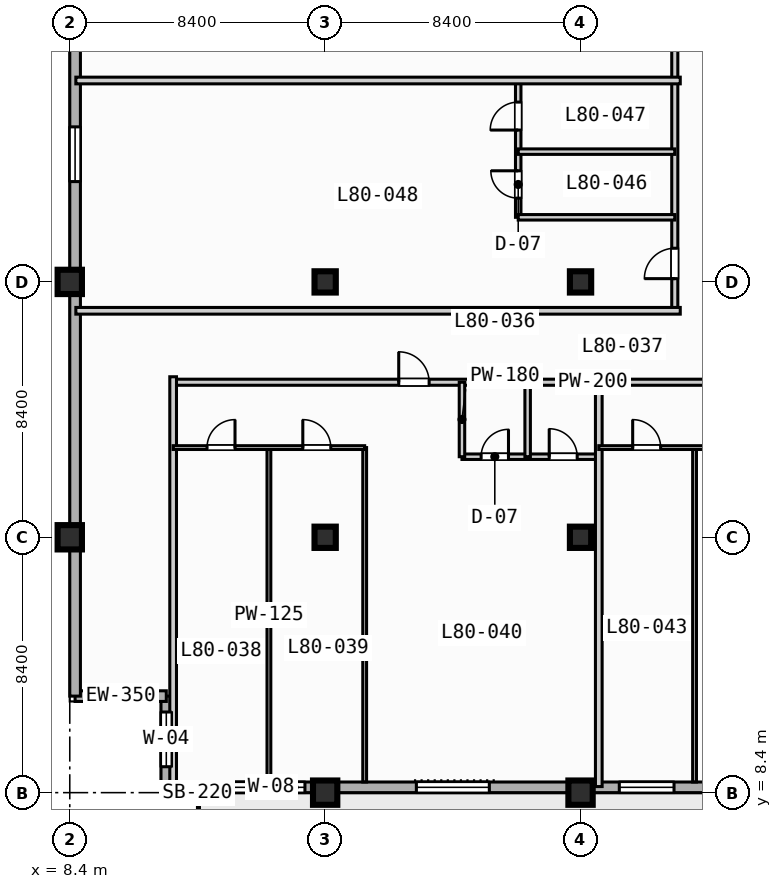
"""IFC4 building model, lengths in metres.
Left out: names, types, materials, properties, quantities, classifications, styles, units other than length and angle.
Written with IfcOpenShell. Run it as: python <this file> out.ifc"""

import sys

from ifc_helpers import new_model, si_unit, direction, frame, frame_2d, origin, origin_2d, place, context, subcontext, project, spatial, rectangle, extrude, element, fill, save


model = new_model("IFC4")
c1 = context("Model", 3, precision=1e-05, world=origin(), true_north=direction((0.0, 1.0)))
c2 = subcontext(c1, "Body", "Model", "MODEL_VIEW")
j1 = project(units=[si_unit("LENGTHUNIT", "METRE"), si_unit("PLANEANGLEUNIT", "RADIAN")], contexts=[c1])
p1 = place(None, origin())
s1 = spatial("IfcSite", under=j1, at=p1, CompositionType="ELEMENT")
p2 = place(p1, origin())
s2 = spatial("IfcBuilding", under=s1, at=p2, CompositionType="ELEMENT")
p3 = place(p2, frame((0.0, 0.0, 324.2)))
s3 = spatial("IfcBuildingStorey", under=s2, at=p3, CompositionType="ELEMENT", Elevation=324.2)
for number, where, z_axis, x_axis in (
    (1, (8.4, 16.8, 0.0), (0.0, 0.0, 1.0), (1.0, 0.0, 0.0)),
    (2, (8.4, 25.2, 0.0), (0.0, 0.0, 1.0), (1.0, 0.0, 0.0)),
    (3, (16.8, 8.4, 0.0), (0.0, 0.0, 1.0), (1.0, 0.0, 0.0)),
):
    element("IfcColumn", number, at=place(p3, frame(where, z_axis=z_axis, x_axis=x_axis)), inside=s3, PredefinedType="COLUMN", context=c2, shape_type="SweptSolid", body=[
        extrude(rectangle(XDim=0.8, YDim=0.8, at=origin_2d()), origin(), (0.0, 0.0, 1.0), 3.9),
    ])
for number, where, z_axis, x_axis in (
    (4, (16.8, 16.8, 0.0), (0.0, 0.0, 1.0), (1.0, 0.0, 0.0)),
    (5, (16.8, 25.2, 0.0), (0.0, 0.0, 1.0), (1.0, 0.0, 0.0)),
):
    element("IfcColumn", number, at=place(p3, frame(where, z_axis=z_axis, x_axis=x_axis)), inside=s3, PredefinedType="COLUMN", context=c2, shape_type="SweptSolid", body=[
        extrude(rectangle(XDim=0.7, YDim=0.7, at=origin_2d()), origin(), (0.0, 0.0, 1.0), 3.9),
    ])
p4 = place(p3, frame((25.2, 8.4, 0.0), z_axis=(0.0, 0.0, 1.0), x_axis=(1.0, 0.0, 0.0)))
e6 = element("IfcColumn", 6, at=p4, inside=s3, PredefinedType="COLUMN", context=c2, shape_type="SweptSolid", body=[
    extrude(rectangle(XDim=0.8, YDim=0.8, at=origin_2d()), origin(), (0.0, 0.0, 1.0), 3.9),
])
for number, where, z_axis, x_axis in (
    (7, (25.2, 16.8, 0.0), (0.0, 0.0, 1.0), (1.0, 0.0, 0.0)),
    (8, (25.2, 25.2, 0.0), (0.0, 0.0, 1.0), (1.0, 0.0, 0.0)),
):
    element("IfcColumn", number, at=place(p3, frame(where, z_axis=z_axis, x_axis=x_axis)), inside=s3, PredefinedType="COLUMN", context=c2, shape_type="SweptSolid", body=[
        extrude(rectangle(XDim=0.7, YDim=0.7, at=origin_2d()), origin(), (0.0, 0.0, 1.0), 3.9),
    ])
p5 = place(p3, frame((11.575, 8.575, 0.0), z_axis=(0.0, 0.0, 1.0), x_axis=(0.0, 1.0, 0.0)))
e9 = element("IfcWall", 9, at=p5, inside=s3, PredefinedType="STANDARD", context=c2, shape_type="SweptSolid", body=[
    extrude(rectangle(XDim=3.0, YDim=0.35, at=frame_2d((1.5, 0.0))), origin(), (0.0, 0.0, 1.0), 3.67),
])
p6 = place(p5, frame((0.677, 0.0, 0.85)))
e10 = element("IfcOpeningElement", 10, at=p6, cuts=e9, PredefinedType="OPENING", context=c2, shape_type="SweptSolid", body=[
    extrude(rectangle(XDim=1.8, YDim=1.8, at=frame_2d((0.9, 0.9))), frame((0.0, 0.185, 0.0), z_axis=(0.0, -1.0, 0.0), x_axis=(1.0, 0.0, 0.0)), (0.0, 0.0, 1.0), 0.37),
])
p7 = place(p3, frame((11.575, 11.575, 0.0), z_axis=(0.0, 0.0, 1.0), x_axis=(-1.0, 0.0, 0.0)))
e11 = element("IfcWall", 11, at=p7, inside=s3, PredefinedType="STANDARD", context=c2, shape_type="SweptSolid", body=[
    extrude(rectangle(XDim=3.0, YDim=0.35, at=frame_2d((1.5, 0.0))), origin(), (0.0, 0.0, 1.0), 3.67),
])
p8 = place(p3, frame((8.575, 11.575, 0.0), z_axis=(0.0, 0.0, 1.0), x_axis=(0.0, 1.0, 0.0)))
e12 = element("IfcWall", 12, at=p8, inside=s3, PredefinedType="STANDARD", context=c2, shape_type="SweptSolid", body=[
    extrude(rectangle(XDim=60.85, YDim=0.35, at=frame_2d((30.425, 0.0))), origin(), (0.0, 0.0, 1.0), 3.67),
])
p9 = place(p8, frame((33.925, 0.0, 0.0)))
e13 = element("IfcOpeningElement", 13, at=p9, cuts=e12, PredefinedType="OPENING", context=c2, shape_type="SweptSolid", body=[
    extrude(rectangle(XDim=1.4, YDim=2.2, at=frame_2d((0.7, 1.1))), frame((0.0, 0.185, 0.0), z_axis=(0.0, -1.0, 0.0), x_axis=(1.0, 0.0, 0.0)), (0.0, 0.0, 1.0), 0.37),
])
p10 = place(p8, frame((16.925, 0.0, 0.85)))
e14 = element("IfcOpeningElement", 14, at=p10, cuts=e12, PredefinedType="OPENING", context=c2, shape_type="SweptSolid", body=[
    extrude(rectangle(XDim=1.8, YDim=1.8, at=frame_2d((0.9, 0.9))), frame((0.0, 0.185, 0.0), z_axis=(0.0, -1.0, 0.0), x_axis=(1.0, 0.0, 0.0)), (0.0, 0.0, 1.0), 0.37),
])
p11 = place(p8, frame((25.025, 0.0, 0.85)))
e15 = element("IfcOpeningElement", 15, at=p11, cuts=e12, PredefinedType="OPENING", context=c2, shape_type="SweptSolid", body=[
    extrude(rectangle(XDim=2.4, YDim=1.95, at=frame_2d((1.2, 0.975))), frame((0.0, 0.185, 0.0), z_axis=(0.0, -1.0, 0.0), x_axis=(1.0, 0.0, 0.0)), (0.0, 0.0, 1.0), 0.37),
])
p12 = place(p8, frame((41.825, 0.0, 0.85)))
e16 = element("IfcOpeningElement", 16, at=p12, cuts=e12, PredefinedType="OPENING", context=c2, shape_type="SweptSolid", body=[
    extrude(rectangle(XDim=2.4, YDim=1.95, at=frame_2d((1.2, 0.975))), frame((0.0, 0.185, 0.0), z_axis=(0.0, -1.0, 0.0), x_axis=(1.0, 0.0, 0.0)), (0.0, 0.0, 1.0), 0.37),
])
p13 = place(p3, frame((64.025, 8.575, 0.0), z_axis=(0.0, 0.0, 1.0), x_axis=(-1.0, 0.0, 0.0)))
e17 = element("IfcWall", 17, at=p13, inside=s3, PredefinedType="STANDARD", context=c2, shape_type="SweptSolid", body=[
    extrude(rectangle(XDim=52.45, YDim=0.35, at=frame_2d((26.225, 0.0))), origin(), (0.0, 0.0, 1.0), 3.67),
])
p14 = place(p13, frame((32.925, 0.0, 0.0)))
e18 = element("IfcOpeningElement", 18, at=p14, cuts=e17, PredefinedType="OPENING", context=c2, shape_type="SweptSolid", body=[
    extrude(rectangle(XDim=1.4, YDim=2.2, at=frame_2d((0.7, 1.1))), frame((0.0, 0.185, 0.0), z_axis=(0.0, -1.0, 0.0), x_axis=(1.0, 0.0, 0.0)), (0.0, 0.0, 1.0), 0.37),
])
p15 = place(p13, frame((41.825, 0.0, 0.85)))
e19 = element("IfcOpeningElement", 19, at=p15, cuts=e17, PredefinedType="OPENING", context=c2, shape_type="SweptSolid", body=[
    extrude(rectangle(XDim=2.4, YDim=1.95, at=frame_2d((1.2, 0.975))), frame((0.0, 0.185, 0.0), z_axis=(0.0, -1.0, 0.0), x_axis=(1.0, 0.0, 0.0)), (0.0, 0.0, 1.0), 0.37),
])
p16 = place(p13, frame((25.025, 0.0, 0.85)))
e20 = element("IfcOpeningElement", 20, at=p16, cuts=e17, PredefinedType="OPENING", context=c2, shape_type="SweptSolid", body=[
    extrude(rectangle(XDim=2.4, YDim=1.95, at=frame_2d((1.2, 0.975))), frame((0.0, 0.185, 0.0), z_axis=(0.0, -1.0, 0.0), x_axis=(1.0, 0.0, 0.0)), (0.0, 0.0, 1.0), 0.37),
])
p17 = place(p13, frame((16.925, 0.0, 0.85)))
e21 = element("IfcOpeningElement", 21, at=p17, cuts=e17, PredefinedType="OPENING", context=c2, shape_type="SweptSolid", body=[
    extrude(rectangle(XDim=1.8, YDim=1.8, at=frame_2d((0.9, 0.9))), frame((0.0, 0.185, 0.0), z_axis=(0.0, -1.0, 0.0), x_axis=(1.0, 0.0, 0.0)), (0.0, 0.0, 1.0), 0.37),
])
p18 = place(p13, frame((49.75, 0.0, 0.85)))
e22 = element("IfcOpeningElement", 22, at=p18, cuts=e17, PredefinedType="OPENING", context=c2, shape_type="SweptSolid", body=[
    extrude(rectangle(XDim=1.8, YDim=1.8, at=frame_2d((0.9, 0.9))), frame((0.0, 0.185, 0.0), z_axis=(0.0, -1.0, 0.0), x_axis=(1.0, 0.0, 0.0)), (0.0, 0.0, 1.0), 0.37),
])
p19 = place(p13, frame((47.89, 0.0, 0.85)))
e23 = element("IfcOpeningElement", 23, at=p19, cuts=e17, PredefinedType="OPENING", context=c2, shape_type="SweptSolid", body=[
    extrude(rectangle(XDim=0.72, YDim=1.8, at=frame_2d((0.36, 0.9))), frame((0.0, 0.185, 0.0), z_axis=(0.0, -1.0, 0.0), x_axis=(1.0, 0.0, 0.0)), (0.0, 0.0, 1.0), 0.37),
])
p20 = place(p13, frame((35.75, 0.0, 0.85)))
e24 = element("IfcOpeningElement", 24, at=p20, cuts=e17, PredefinedType="OPENING", context=c2, shape_type="SweptSolid", body=[
    extrude(rectangle(XDim=1.8, YDim=1.8, at=frame_2d((0.9, 0.9))), frame((0.0, 0.185, 0.0), z_axis=(0.0, -1.0, 0.0), x_axis=(1.0, 0.0, 0.0)), (0.0, 0.0, 1.0), 0.37),
])
p21 = place(p3, frame((11.8, 21.9, 0.0), z_axis=(0.0, 0.0, 1.0), x_axis=(1.0, 0.0, 0.0)))
e25 = element("IfcWall", 25, at=p21, inside=s3, PredefinedType="PARTITIONING", context=c2, shape_type="SweptSolid", body=[
    extrude(rectangle(XDim=27.6, YDim=0.2, at=frame_2d((13.8, 0.0))), origin(), (0.0, 0.0, 1.0), 3.67),
])
p22 = place(p21, frame((7.42, 0.0, 0.0)))
e26 = element("IfcOpeningElement", 26, at=p22, cuts=e25, PredefinedType="OPENING", context=c2, shape_type="SweptSolid", body=[
    extrude(rectangle(XDim=1.0, YDim=2.15, at=frame_2d((0.5, 1.075))), frame((0.0, 0.11, 0.0), z_axis=(0.0, -1.0, 0.0), x_axis=(1.0, 0.0, 0.0)), (0.0, 0.0, 1.0), 0.22),
])
p23 = place(p21, frame((21.22, 0.0, 0.0)))
e27 = element("IfcOpeningElement", 27, at=p23, cuts=e25, PredefinedType="OPENING", context=c2, shape_type="SweptSolid", body=[
    extrude(rectangle(XDim=1.0, YDim=2.15, at=frame_2d((0.5, 1.075))), frame((0.0, 0.11, 0.0), z_axis=(0.0, -1.0, 0.0), x_axis=(1.0, 0.0, 0.0)), (0.0, 0.0, 1.0), 0.22),
])
p24 = place(p3, frame((11.8, 8.6, 0.0), z_axis=(0.0, 0.0, 1.0), x_axis=(0.0, 1.0, 0.0)))
e28 = element("IfcWall", 28, at=p24, inside=s3, PredefinedType="PARTITIONING", context=c2, shape_type="SweptSolid", body=[
    extrude(rectangle(XDim=13.48, YDim=0.22, at=frame_2d((6.74, 0.0))), origin(), (0.0, 0.0, 1.0), 3.67),
])
p25 = place(p3, frame((21.3, 19.45, 0.0), z_axis=(0.0, 0.0, 1.0), x_axis=(1.0, 0.0, 0.0)))
e29 = element("IfcWall", 29, at=p25, inside=s3, PredefinedType="PLUMBINGWALL", context=c2, shape_type="SweptSolid", body=[
    extrude(rectangle(XDim=4.5, YDim=0.18, at=frame_2d((2.25, 0.0))), origin(), (0.0, 0.0, 1.0), 3.67),
])
p26 = place(p25, frame((0.63, 0.0, 0.0)))
e30 = element("IfcOpeningElement", 30, at=p26, cuts=e29, PredefinedType="OPENING", context=c2, shape_type="SweptSolid", body=[
    extrude(rectangle(XDim=0.9, YDim=2.1, at=frame_2d((0.45, 1.05))), frame((0.0, 0.1, 0.0), z_axis=(0.0, -1.0, 0.0), x_axis=(1.0, 0.0, 0.0)), (0.0, 0.0, 1.0), 0.2),
])
p27 = place(p25, frame((2.87, 0.0, 0.0)))
e31 = element("IfcOpeningElement", 31, at=p27, cuts=e29, PredefinedType="OPENING", context=c2, shape_type="SweptSolid", body=[
    extrude(rectangle(XDim=0.92, YDim=2.1, at=frame_2d((0.46, 1.05))), frame((0.0, 0.1, 0.0), z_axis=(0.0, -1.0, 0.0), x_axis=(1.0, 0.0, 0.0)), (0.0, 0.0, 1.0), 0.2),
])
for number, where, z_axis, x_axis in (
    (32, (21.3, 19.45, 0.0), (0.0, 0.0, 1.0), (0.0, 1.0, 0.0)),
    (33, (23.46, 19.45, 0.0), (0.0, 0.0, 1.0), (0.0, 1.0, 0.0)),
):
    element("IfcWall", number, at=place(p3, frame(where, z_axis=z_axis, x_axis=x_axis)), inside=s3, PredefinedType="PLUMBINGWALL", context=c2, shape_type="SweptSolid", body=[
        extrude(rectangle(XDim=2.45, YDim=0.18, at=frame_2d((1.225, 0.0))), origin(), (0.0, 0.0, 1.0), 3.67),
    ])
for number, where, z_axis, x_axis in (
    (34, (14.95, 8.75, 0.0), (0.0, 0.0, 1.0), (0.0, 1.0, 0.0)),
    (35, (18.1, 8.75, 0.0), (0.0, 0.0, 1.0), (0.0, 1.0, 0.0)),
):
    element("IfcWall", number, at=place(p3, frame(where, z_axis=z_axis, x_axis=x_axis)), inside=s3, PredefinedType="PARTITIONING", context=c2, shape_type="SweptSolid", body=[
        extrude(rectangle(XDim=11.0, YDim=0.125, at=frame_2d((5.5, 0.0))), origin(), (0.0, 0.0, 1.0), 3.67),
    ])
p28 = place(p3, frame((11.8, 19.75, 0.0), z_axis=(0.0, 0.0, 1.0), x_axis=(1.0, 0.0, 0.0)))
e36 = element("IfcWall", 36, at=p28, inside=s3, PredefinedType="PARTITIONING", context=c2, shape_type="SweptSolid", body=[
    extrude(rectangle(XDim=6.3, YDim=0.125, at=frame_2d((3.15, 0.0))), origin(), (0.0, 0.0, 1.0), 3.67),
])
p29 = place(p28, frame((1.115, 0.0, 0.0)))
e37 = element("IfcOpeningElement", 37, at=p29, cuts=e36, PredefinedType="OPENING", context=c2, shape_type="SweptSolid", body=[
    extrude(rectangle(XDim=0.92, YDim=2.1, at=frame_2d((0.46, 1.05))), frame((0.0, 0.073, 0.0), z_axis=(0.0, -1.0, 0.0), x_axis=(1.0, 0.0, 0.0)), (0.0, 0.0, 1.0), 0.145),
])
p30 = place(p28, frame((4.265, 0.0, 0.0)))
e38 = element("IfcOpeningElement", 38, at=p30, cuts=e36, PredefinedType="OPENING", context=c2, shape_type="SweptSolid", body=[
    extrude(rectangle(XDim=0.92, YDim=2.1, at=frame_2d((0.46, 1.05))), frame((0.0, 0.073, 0.0), z_axis=(0.0, -1.0, 0.0), x_axis=(1.0, 0.0, 0.0)), (0.0, 0.0, 1.0), 0.145),
])
p31 = place(p3, frame((25.8, 8.6, 0.0), z_axis=(0.0, 0.0, 1.0), x_axis=(0.0, 1.0, 0.0)))
e39 = element("IfcWall", 39, at=p31, inside=s3, PredefinedType="PARTITIONING", context=c2, shape_type="SweptSolid", body=[
    extrude(rectangle(XDim=13.48, YDim=0.22, at=frame_2d((6.74, 0.0))), origin(), (0.0, 0.0, 1.0), 3.67),
])
p32 = place(p3, frame((28.95, 8.75, 0.0), z_axis=(0.0, 0.0, 1.0), x_axis=(0.0, 1.0, 0.0)))
e40 = element("IfcWall", 40, at=p32, inside=s3, PredefinedType="PARTITIONING", context=c2, shape_type="SweptSolid", body=[
    extrude(rectangle(XDim=11.0, YDim=0.125, at=frame_2d((5.5, 0.0))), origin(), (0.0, 0.0, 1.0), 3.67),
])
p33 = place(p3, frame((25.8, 19.75, 0.0), z_axis=(0.0, 0.0, 1.0), x_axis=(1.0, 0.0, 0.0)))
e41 = element("IfcWall", 41, at=p33, inside=s3, PredefinedType="PARTITIONING", context=c2, shape_type="SweptSolid", body=[
    extrude(rectangle(XDim=6.3, YDim=0.125, at=frame_2d((3.15, 0.0))), origin(), (0.0, 0.0, 1.0), 3.67),
])
p34 = place(p33, frame((1.115, 0.0, 0.0)))
e42 = element("IfcOpeningElement", 42, at=p34, cuts=e41, PredefinedType="OPENING", context=c2, shape_type="SweptSolid", body=[
    extrude(rectangle(XDim=0.92, YDim=2.1, at=frame_2d((0.46, 1.05))), frame((0.0, 0.073, 0.0), z_axis=(0.0, -1.0, 0.0), x_axis=(1.0, 0.0, 0.0)), (0.0, 0.0, 1.0), 0.145),
])
p35 = place(p33, frame((4.265, 0.0, 0.0)))
e43 = element("IfcOpeningElement", 43, at=p35, cuts=e41, PredefinedType="OPENING", context=c2, shape_type="SweptSolid", body=[
    extrude(rectangle(XDim=0.92, YDim=2.1, at=frame_2d((0.46, 1.05))), frame((0.0, 0.073, 0.0), z_axis=(0.0, -1.0, 0.0), x_axis=(1.0, 0.0, 0.0)), (0.0, 0.0, 1.0), 0.145),
])
p36 = place(p3, frame((28.3, 24.25, 0.0), z_axis=(0.0, 0.0, 1.0), x_axis=(0.0, 1.0, 0.0)))
e44 = element("IfcWall", 44, at=p36, inside=s3, PredefinedType="PARTITIONING", context=c2, shape_type="SweptSolid", body=[
    extrude(rectangle(XDim=15.15, YDim=0.2, at=frame_2d((7.575, 0.0))), origin(), (0.0, 0.0, 1.0), 3.67),
])
p37 = place(p36, frame((1.058, 0.0, 0.0)))
e45 = element("IfcOpeningElement", 45, at=p37, cuts=e44, PredefinedType="OPENING", context=c2, shape_type="SweptSolid", body=[
    extrude(rectangle(XDim=1.0, YDim=2.15, at=frame_2d((0.5, 1.075))), frame((0.0, 0.11, 0.0), z_axis=(0.0, -1.0, 0.0), x_axis=(1.0, 0.0, 0.0)), (0.0, 0.0, 1.0), 0.22),
])
p38 = place(p36, frame((8.633, 0.0, 0.0)))
e46 = element("IfcOpeningElement", 46, at=p38, cuts=e44, PredefinedType="OPENING", context=c2, shape_type="SweptSolid", body=[
    extrude(rectangle(XDim=1.0, YDim=2.15, at=frame_2d((0.5, 1.075))), frame((0.0, 0.11, 0.0), z_axis=(0.0, -1.0, 0.0), x_axis=(1.0, 0.0, 0.0)), (0.0, 0.0, 1.0), 0.22),
])
p39 = place(p3, frame((8.6, 24.25, 0.0), z_axis=(0.0, 0.0, 1.0), x_axis=(1.0, 0.0, 0.0)))
e47 = element("IfcWall", 47, at=p39, inside=s3, PredefinedType="PARTITIONING", context=c2, shape_type="SweptSolid", body=[
    extrude(rectangle(XDim=19.88, YDim=0.22, at=frame_2d((9.94, 0.0))), origin(), (0.0, 0.0, 1.0), 3.67),
])
p40 = place(p3, frame((23.15, 27.325, 0.0), z_axis=(0.0, 0.0, 1.0), x_axis=(0.0, 1.0, 0.0)))
e48 = element("IfcWall", 48, at=p40, inside=s3, PredefinedType="PLUMBINGWALL", context=c2, shape_type="SweptSolid", body=[
    extrude(rectangle(XDim=4.5, YDim=0.18, at=frame_2d((2.25, 0.0))), origin(), (0.0, 0.0, 1.0), 3.67),
])
p41 = place(p40, frame((0.63, 0.0, 0.0)))
e49 = element("IfcOpeningElement", 49, at=p41, cuts=e48, PredefinedType="OPENING", context=c2, shape_type="SweptSolid", body=[
    extrude(rectangle(XDim=0.9, YDim=2.1, at=frame_2d((0.45, 1.05))), frame((0.0, 0.1, 0.0), z_axis=(0.0, -1.0, 0.0), x_axis=(1.0, 0.0, 0.0)), (0.0, 0.0, 1.0), 0.2),
])
p42 = place(p40, frame((2.87, 0.0, 0.0)))
e50 = element("IfcOpeningElement", 50, at=p42, cuts=e48, PredefinedType="OPENING", context=c2, shape_type="SweptSolid", body=[
    extrude(rectangle(XDim=0.92, YDim=2.1, at=frame_2d((0.46, 1.05))), frame((0.0, 0.1, 0.0), z_axis=(0.0, -1.0, 0.0), x_axis=(1.0, 0.0, 0.0)), (0.0, 0.0, 1.0), 0.2),
])
for number, where, z_axis, x_axis in (
    (51, (23.15, 27.325, 0.0), (0.0, 0.0, 1.0), (1.0, 0.0, 0.0)),
    (52, (23.15, 29.485, 0.0), (0.0, 0.0, 1.0), (1.0, 0.0, 0.0)),
):
    element("IfcWall", number, at=place(p3, frame(where, z_axis=z_axis, x_axis=x_axis)), inside=s3, PredefinedType="PLUMBINGWALL", context=c2, shape_type="SweptSolid", body=[
        extrude(rectangle(XDim=5.15, YDim=0.18, at=frame_2d((2.575, 0.0))), origin(), (0.0, 0.0, 1.0), 3.67),
    ])
p43 = place(p3, frame((8.6, 31.825, 0.0), z_axis=(0.0, 0.0, 1.0), x_axis=(1.0, 0.0, 0.0)))
e53 = element("IfcWall", 53, at=p43, inside=s3, PredefinedType="PARTITIONING", context=c2, shape_type="SweptSolid", body=[
    extrude(rectangle(XDim=19.88, YDim=0.22, at=frame_2d((9.94, 0.0))), origin(), (0.0, 0.0, 1.0), 3.67),
])
p44 = place(p6, origin())
e54 = element("IfcWindow", 54, at=p44, inside=s3, PartitioningType="SINGLE_PANEL", PredefinedType="WINDOW", context=c2, shape_type="SweptSolid", body=[
    extrude(rectangle(XDim=1.8, YDim=1.8, at=frame_2d((0.9, 0.9))), frame((0.0, 0.03, 0.0), z_axis=(0.0, -1.0, 0.0), x_axis=(1.0, 0.0, 0.0)), (0.0, 0.0, 1.0), 0.06),
])
fill(e10, e54)
p45 = place(p10, origin())
e55 = element("IfcWindow", 55, at=p45, inside=s3, PartitioningType="SINGLE_PANEL", PredefinedType="WINDOW", context=c2, shape_type="SweptSolid", body=[
    extrude(rectangle(XDim=1.8, YDim=1.8, at=frame_2d((0.9, 0.9))), frame((0.0, 0.03, 0.0), z_axis=(0.0, -1.0, 0.0), x_axis=(1.0, 0.0, 0.0)), (0.0, 0.0, 1.0), 0.06),
])
fill(e14, e55)
p46 = place(p15, origin())
e56 = element("IfcWindow", 56, at=p46, inside=s3, PartitioningType="SINGLE_PANEL", PredefinedType="WINDOW", context=c2, shape_type="SweptSolid", body=[
    extrude(rectangle(XDim=2.4, YDim=1.95, at=frame_2d((1.2, 0.975))), frame((0.0, 0.03, 0.0), z_axis=(0.0, -1.0, 0.0), x_axis=(1.0, 0.0, 0.0)), (0.0, 0.0, 1.0), 0.06),
])
fill(e19, e56)
p47 = place(p18, origin())
e57 = element("IfcWindow", 57, at=p47, inside=s3, PartitioningType="SINGLE_PANEL", PredefinedType="WINDOW", context=c2, shape_type="SweptSolid", body=[
    extrude(rectangle(XDim=1.8, YDim=1.8, at=frame_2d((0.9, 0.9))), frame((0.0, 0.03, 0.0), z_axis=(0.0, -1.0, 0.0), x_axis=(1.0, 0.0, 0.0)), (0.0, 0.0, 1.0), 0.06),
])
fill(e22, e57)
p48 = place(p19, origin())
e58 = element("IfcWindow", 58, at=p48, inside=s3, PartitioningType="SINGLE_PANEL", PredefinedType="WINDOW", context=c2, shape_type="SweptSolid", body=[
    extrude(rectangle(XDim=0.72, YDim=1.8, at=frame_2d((0.36, 0.9))), frame((0.0, 0.03, 0.0), z_axis=(0.0, -1.0, 0.0), x_axis=(1.0, 0.0, 0.0)), (0.0, 0.0, 1.0), 0.06),
])
fill(e23, e58)
p49 = place(p20, origin())
e59 = element("IfcWindow", 59, at=p49, inside=s3, PartitioningType="SINGLE_PANEL", PredefinedType="WINDOW", context=c2, shape_type="SweptSolid", body=[
    extrude(rectangle(XDim=1.8, YDim=1.8, at=frame_2d((0.9, 0.9))), frame((0.0, 0.03, 0.0), z_axis=(0.0, -1.0, 0.0), x_axis=(1.0, 0.0, 0.0)), (0.0, 0.0, 1.0), 0.06),
])
fill(e24, e59)
p50 = place(p22, origin())
e60 = element("IfcDoor", 60, at=p50, inside=s3, OperationType="SINGLE_SWING_LEFT", PredefinedType="DOOR", context=c2, shape_type="SweptSolid", body=[
    extrude(rectangle(XDim=1.0, YDim=2.15, at=frame_2d((0.5, 1.075))), frame((0.0, 0.025, 0.0), z_axis=(0.0, -1.0, 0.0), x_axis=(1.0, 0.0, 0.0)), (0.0, 0.0, 1.0), 0.05),
])
fill(e26, e60)
p51 = place(p26, origin())
e61 = element("IfcDoor", 61, at=p51, inside=s3, OperationType="SINGLE_SWING_RIGHT", PredefinedType="DOOR", context=c2, shape_type="SweptSolid", body=[
    extrude(rectangle(XDim=0.9, YDim=2.1, at=frame_2d((0.45, 1.05))), frame((0.0, 0.025, 0.0), z_axis=(0.0, -1.0, 0.0), x_axis=(1.0, 0.0, 0.0)), (0.0, 0.0, 1.0), 0.05),
])
fill(e30, e61)
p52 = place(p27, origin())
e62 = element("IfcDoor", 62, at=p52, inside=s3, OperationType="SINGLE_SWING_LEFT", PredefinedType="DOOR", context=c2, shape_type="SweptSolid", body=[
    extrude(rectangle(XDim=0.92, YDim=2.1, at=frame_2d((0.46, 1.05))), frame((0.0, 0.025, 0.0), z_axis=(0.0, -1.0, 0.0), x_axis=(1.0, 0.0, 0.0)), (0.0, 0.0, 1.0), 0.05),
])
fill(e31, e62)
p53 = place(p29, origin())
e63 = element("IfcDoor", 63, at=p53, inside=s3, OperationType="SINGLE_SWING_RIGHT", PredefinedType="DOOR", context=c2, shape_type="SweptSolid", body=[
    extrude(rectangle(XDim=0.92, YDim=2.1, at=frame_2d((0.46, 1.05))), frame((0.0, 0.025, 0.0), z_axis=(0.0, -1.0, 0.0), x_axis=(1.0, 0.0, 0.0)), (0.0, 0.0, 1.0), 0.05),
])
fill(e37, e63)
p54 = place(p30, origin())
e64 = element("IfcDoor", 64, at=p54, inside=s3, OperationType="SINGLE_SWING_LEFT", PredefinedType="DOOR", context=c2, shape_type="SweptSolid", body=[
    extrude(rectangle(XDim=0.92, YDim=2.1, at=frame_2d((0.46, 1.05))), frame((0.0, 0.025, 0.0), z_axis=(0.0, -1.0, 0.0), x_axis=(1.0, 0.0, 0.0)), (0.0, 0.0, 1.0), 0.05),
])
fill(e38, e64)
p55 = place(p34, origin())
e65 = element("IfcDoor", 65, at=p55, inside=s3, OperationType="SINGLE_SWING_LEFT", PredefinedType="DOOR", context=c2, shape_type="SweptSolid", body=[
    extrude(rectangle(XDim=0.92, YDim=2.1, at=frame_2d((0.46, 1.05))), frame((0.0, 0.025, 0.0), z_axis=(0.0, -1.0, 0.0), x_axis=(1.0, 0.0, 0.0)), (0.0, 0.0, 1.0), 0.05),
])
fill(e42, e65)
p56 = place(p37, origin())
e66 = element("IfcDoor", 66, at=p56, inside=s3, OperationType="SINGLE_SWING_LEFT", PredefinedType="DOOR", context=c2, shape_type="SweptSolid", body=[
    extrude(rectangle(XDim=1.0, YDim=2.15, at=frame_2d((0.5, 1.075))), frame((0.0, 0.025, 0.0), z_axis=(0.0, -1.0, 0.0), x_axis=(1.0, 0.0, 0.0)), (0.0, 0.0, 1.0), 0.05),
])
fill(e45, e66)
p57 = place(p41, origin())
e67 = element("IfcDoor", 67, at=p57, inside=s3, OperationType="SINGLE_SWING_RIGHT", PredefinedType="DOOR", context=c2, shape_type="SweptSolid", body=[
    extrude(rectangle(XDim=0.9, YDim=2.1, at=frame_2d((0.45, 1.05))), frame((0.0, 0.025, 0.0), z_axis=(0.0, -1.0, 0.0), x_axis=(1.0, 0.0, 0.0)), (0.0, 0.0, 1.0), 0.05),
])
fill(e49, e67)
p58 = place(p42, origin())
e68 = element("IfcDoor", 68, at=p58, inside=s3, OperationType="SINGLE_SWING_LEFT", PredefinedType="DOOR", context=c2, shape_type="SweptSolid", body=[
    extrude(rectangle(XDim=0.92, YDim=2.1, at=frame_2d((0.46, 1.05))), frame((0.0, 0.025, 0.0), z_axis=(0.0, -1.0, 0.0), x_axis=(1.0, 0.0, 0.0)), (0.0, 0.0, 1.0), 0.05),
])
fill(e50, e68)
save(model, sys.argv[1])
